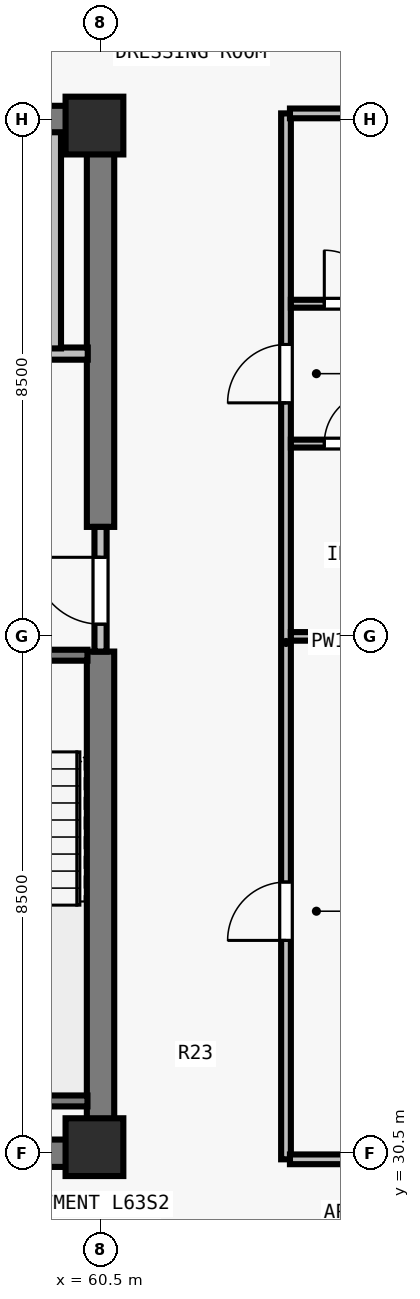
"""IFC4 building model, lengths in metres.
Left out: names, types, materials, properties, quantities, classifications, styles, units other than length and angle.
Written with IfcOpenShell. Run it as: python <this file> out.ifc"""

import sys

from ifc_helpers import new_model, si_unit, direction, frame, frame_2d, origin, origin_2d, place, context, subcontext, project, spatial, rectangle, extrude, element, fill, save


model = new_model("IFC4")
c1 = context("Model", 3, precision=1e-05, world=origin(), true_north=direction((0.0, 1.0)))
c2 = subcontext(c1, "Body", "Model", "MODEL_VIEW")
j1 = project(units=[si_unit("LENGTHUNIT", "METRE"), si_unit("PLANEANGLEUNIT", "RADIAN")], contexts=[c1])
p1 = place(None, origin())
s1 = spatial("IfcSite", under=j1, at=p1, CompositionType="ELEMENT")
p2 = place(p1, origin())
s2 = spatial("IfcBuilding", under=s1, at=p2, CompositionType="ELEMENT")
p3 = place(p2, frame((0.0, 0.0, 230.5)))
s3 = spatial("IfcBuildingStorey", under=s2, at=p3, CompositionType="ELEMENT", Elevation=230.5)
for number, where, z_axis, x_axis in (
    (1, (60.4, 30.6, 0.0), (0.0, 0.0, 1.0), (1.0, 0.0, 0.0)),
    (2, (60.4, 47.4, 0.0), (0.0, 0.0, 1.0), (1.0, 0.0, 0.0)),
):
    element("IfcColumn", number, at=place(p3, frame(where, z_axis=z_axis, x_axis=x_axis)), inside=s3, PredefinedType="COLUMN", context=c2, shape_type="SweptSolid", body=[
        extrude(rectangle(XDim=0.95, YDim=0.95, at=origin_2d()), origin(), (0.0, 0.0, 1.0), 3.5),
    ])
for number, where, z_axis, x_axis in (
    (3, (43.275, 30.5, 0.0), (0.0, 0.0, 1.0), (1.0, 0.0, 0.0)),
    (4, (43.275, 47.5, 0.0), (0.0, 0.0, 1.0), (1.0, 0.0, 0.0)),
):
    element("IfcWall", number, at=place(p3, frame(where, z_axis=z_axis, x_axis=x_axis)), inside=s3, PredefinedType="SHEAR", context=c2, shape_type="SweptSolid", body=[
        extrude(rectangle(XDim=17.45, YDim=0.45, at=frame_2d((8.725, 0.0))), origin(), (0.0, 0.0, 1.0), 3.29),
    ])
p4 = place(p3, frame((60.5, 30.715, 0.0), z_axis=(0.0, 0.0, 1.0), x_axis=(0.0, 1.0, 0.0)))
e5 = element("IfcWall", 5, at=p4, inside=s3, PredefinedType="SHEAR", context=c2, shape_type="SweptSolid", body=[
    extrude(rectangle(XDim=8.035, YDim=0.45, at=frame_2d((4.018, 0.0))), origin(), (0.0, 0.0, 1.0), 3.29),
])
p5 = place(p3, frame((60.5, 40.8, 0.0), z_axis=(0.0, 0.0, 1.0), x_axis=(0.0, 1.0, 0.0)))
e6 = element("IfcWall", 6, at=p5, inside=s3, PredefinedType="SHEAR", context=c2, shape_type="SweptSolid", body=[
    extrude(rectangle(XDim=6.485, YDim=0.45, at=frame_2d((3.242, 0.0))), origin(), (0.0, 0.0, 1.0), 3.29),
])
p6 = place(p3, frame((60.5, 38.75, 0.0), z_axis=(0.0, 0.0, 1.0), x_axis=(0.0, 1.0, 0.0)))
e7 = element("IfcWall", 7, at=p6, inside=s3, PredefinedType="SOLIDWALL", context=c2, shape_type="SweptSolid", body=[
    extrude(rectangle(XDim=2.05, YDim=0.2, at=frame_2d((1.025, 0.0))), origin(), (0.0, 0.0, 1.0), 3.29),
])
p7 = place(p6, frame((0.45, 0.0, 0.0)))
e8 = element("IfcOpeningElement", 8, at=p7, cuts=e7, PredefinedType="OPENING", context=c2, shape_type="SweptSolid", body=[
    extrude(rectangle(XDim=1.1, YDim=2.15, at=frame_2d((0.55, 1.075))), frame((0.0, 0.11, 0.0), z_axis=(0.0, -1.0, 0.0), x_axis=(1.0, 0.0, 0.0)), (0.0, 0.0, 1.0), 0.22),
])
p8 = place(p3, frame((56.735, 43.65, 0.0), z_axis=(0.0, 0.0, 1.0), x_axis=(1.0, 0.0, 0.0)))
e9 = element("IfcWall", 9, at=p8, inside=s3, PredefinedType="SOLIDWALL", context=c2, shape_type="SweptSolid", body=[
    extrude(rectangle(XDim=3.555, YDim=0.2, at=frame_2d((1.777, 0.0))), origin(), (0.0, 0.0, 1.0), 3.29),
])
p9 = place(p8, frame((1.295, 0.0, 0.0)))
e10 = element("IfcOpeningElement", 10, at=p9, cuts=e9, PredefinedType="OPENING", context=c2, shape_type="SweptSolid", body=[
    extrude(rectangle(XDim=1.1, YDim=2.2, at=frame_2d((0.55, 1.1))), frame((0.0, 0.11, 0.0), z_axis=(0.0, -1.0, 0.0), x_axis=(1.0, 0.0, 0.0)), (0.0, 0.0, 1.0), 0.22),
])
p10 = place(p3, frame((59.75, 43.735, 0.0), z_axis=(0.0, 0.0, 1.0), x_axis=(0.0, 1.0, 0.0)))
e11 = element("IfcWall", 11, at=p10, inside=s3, PredefinedType="SOLIDWALL", context=c2, shape_type="SweptSolid", body=[
    extrude(rectangle(XDim=3.555, YDim=0.2, at=frame_2d((1.777, 0.0))), origin(), (0.0, 0.0, 1.0), 3.29),
])
p11 = place(p3, frame((63.55, 30.4, 0.0), z_axis=(0.0, 0.0, 1.0), x_axis=(0.0, 1.0, 0.0)))
e12 = element("IfcWall", 12, at=p11, inside=s3, PredefinedType="PARTITIONING", context=c2, shape_type="SweptSolid", body=[
    extrude(rectangle(XDim=17.2, YDim=0.16, at=frame_2d((8.6, 0.0))), origin(), (0.0, 0.0, 1.0), 3.29),
])
p12 = place(p11, frame((3.6, 0.0, 0.0)))
e13 = element("IfcOpeningElement", 13, at=p12, cuts=e12, PredefinedType="OPENING", context=c2, shape_type="SweptSolid", body=[
    extrude(rectangle(XDim=0.96, YDim=2.12, at=frame_2d((0.48, 1.06))), frame((0.0, 0.09, 0.0), z_axis=(0.0, -1.0, 0.0), x_axis=(1.0, 0.0, 0.0)), (0.0, 0.0, 1.0), 0.18),
])
p13 = place(p11, frame((12.44, 0.0, 0.0)))
e14 = element("IfcOpeningElement", 14, at=p13, cuts=e12, PredefinedType="OPENING", context=c2, shape_type="SweptSolid", body=[
    extrude(rectangle(XDim=0.96, YDim=2.18, at=frame_2d((0.48, 1.09))), frame((0.0, 0.09, 0.0), z_axis=(0.0, -1.0, 0.0), x_axis=(1.0, 0.0, 0.0)), (0.0, 0.0, 1.0), 0.18),
])
for number, where, z_axis, x_axis in (
    (15, (63.615, 30.4, 0.0), (0.0, 0.0, 1.0), (1.0, 0.0, 0.0)),
    (16, (63.615, 47.6, 0.0), (0.0, 0.0, 1.0), (1.0, 0.0, 0.0)),
):
    element("IfcWall", number, at=place(p3, frame(where, z_axis=z_axis, x_axis=x_axis)), inside=s3, PredefinedType="PARTITIONING", context=c2, shape_type="SweptSolid", body=[
        extrude(rectangle(XDim=10.58, YDim=0.16, at=frame_2d((5.29, 0.0))), origin(), (0.0, 0.0, 1.0), 3.29),
    ])
p14 = place(p3, frame((63.63, 39.0, 0.0), z_axis=(0.0, 0.0, 1.0), x_axis=(1.0, 0.0, 0.0)))
e17 = element("IfcWall", 17, at=p14, inside=s3, PredefinedType="PARTITIONING", context=c2, shape_type="SweptSolid", body=[
    extrude(rectangle(XDim=10.565, YDim=0.14, at=frame_2d((5.283, 0.0))), origin(), (0.0, 0.0, 1.0), 3.29),
])
p15 = place(p3, frame((63.63, 42.17, 0.0), z_axis=(0.0, 0.0, 1.0), x_axis=(1.0, 0.0, 0.0)))
e18 = element("IfcWall", 18, at=p15, inside=s3, PredefinedType="PLUMBINGWALL", context=c2, shape_type="SweptSolid", body=[
    extrude(rectangle(XDim=2.75, YDim=0.13, at=frame_2d((1.375, 0.0))), origin(), (0.0, 0.0, 1.0), 3.29),
])
p16 = place(p15, frame((0.55, 0.0, 0.0)))
e19 = element("IfcOpeningElement", 19, at=p16, cuts=e18, PredefinedType="OPENING", context=c2, shape_type="SweptSolid", body=[
    extrude(rectangle(XDim=0.85, YDim=2.08, at=frame_2d((0.425, 1.04))), frame((0.0, 0.075, 0.0), z_axis=(0.0, -1.0, 0.0), x_axis=(1.0, 0.0, 0.0)), (0.0, 0.0, 1.0), 0.15),
])
p17 = place(p3, frame((63.63, 44.47, 0.0), z_axis=(0.0, 0.0, 1.0), x_axis=(1.0, 0.0, 0.0)))
e20 = element("IfcWall", 20, at=p17, inside=s3, PredefinedType="PLUMBINGWALL", context=c2, shape_type="SweptSolid", body=[
    extrude(rectangle(XDim=2.75, YDim=0.13, at=frame_2d((1.375, 0.0))), origin(), (0.0, 0.0, 1.0), 3.29),
])
p18 = place(p17, frame((0.55, 0.0, 0.0)))
e21 = element("IfcOpeningElement", 21, at=p18, cuts=e20, PredefinedType="OPENING", context=c2, shape_type="SweptSolid", body=[
    extrude(rectangle(XDim=0.88, YDim=2.1, at=frame_2d((0.44, 1.05))), frame((0.0, 0.075, 0.0), z_axis=(0.0, -1.0, 0.0), x_axis=(1.0, 0.0, 0.0)), (0.0, 0.0, 1.0), 0.15),
])
p19 = place(p3, frame((57.005, 38.69, 0.0), z_axis=(0.0, 0.0, 1.0), x_axis=(1.0, 0.0, 0.0)))
e22 = element("IfcWall", 22, at=p19, inside=s3, PredefinedType="SOLIDWALL", context=c2, shape_type="SweptSolid", body=[
    extrude(rectangle(XDim=3.28, YDim=0.18, at=frame_2d((1.64, 0.0))), origin(), (0.0, 0.0, 1.0), 3.29),
])
p20 = place(p19, frame((1.165, 0.0, 0.0)))
e23 = element("IfcOpeningElement", 23, at=p20, cuts=e22, PredefinedType="OPENING", context=c2, shape_type="SweptSolid", body=[
    extrude(rectangle(XDim=0.95, YDim=2.15, at=frame_2d((0.475, 1.075))), frame((0.0, 0.1, 0.0), z_axis=(0.0, -1.0, 0.0), x_axis=(1.0, 0.0, 0.0)), (0.0, 0.0, 1.0), 0.2),
])
p21 = place(p3, frame((57.005, 31.36, 0.0), z_axis=(0.0, 0.0, 1.0), x_axis=(1.0, 0.0, 0.0)))
e24 = element("IfcWall", 24, at=p21, inside=s3, PredefinedType="SOLIDWALL", context=c2, shape_type="SweptSolid", body=[
    extrude(rectangle(XDim=3.28, YDim=0.18, at=frame_2d((1.64, 0.0))), origin(), (0.0, 0.0, 1.0), 3.29),
])
p22 = place(p7, origin())
e25 = element("IfcDoor", 25, at=p22, inside=s3, OperationType="SINGLE_SWING_RIGHT", PredefinedType="DOOR", context=c2, shape_type="SweptSolid", body=[
    extrude(rectangle(XDim=1.1, YDim=2.15, at=frame_2d((0.55, 1.075))), frame((0.0, 0.025, 0.0), z_axis=(0.0, -1.0, 0.0), x_axis=(1.0, 0.0, 0.0)), (0.0, 0.0, 1.0), 0.05),
])
fill(e8, e25)
p23 = place(p12, origin())
e26 = element("IfcDoor", 26, at=p23, inside=s3, OperationType="SINGLE_SWING_LEFT", PredefinedType="DOOR", context=c2, shape_type="SweptSolid", body=[
    extrude(rectangle(XDim=0.96, YDim=2.12, at=frame_2d((0.48, 1.06))), frame((0.0, 0.025, 0.0), z_axis=(0.0, -1.0, 0.0), x_axis=(1.0, 0.0, 0.0)), (0.0, 0.0, 1.0), 0.05),
])
fill(e13, e26)
p24 = place(p16, origin())
e27 = element("IfcDoor", 27, at=p24, inside=s3, OperationType="SINGLE_SWING_RIGHT", PredefinedType="DOOR", context=c2, shape_type="SweptSolid", body=[
    extrude(rectangle(XDim=0.85, YDim=2.08, at=frame_2d((0.425, 1.04))), frame((0.0, 0.025, 0.0), z_axis=(0.0, -1.0, 0.0), x_axis=(1.0, 0.0, 0.0)), (0.0, 0.0, 1.0), 0.05),
])
fill(e19, e27)
p25 = place(p18, origin())
e28 = element("IfcDoor", 28, at=p25, inside=s3, OperationType="SINGLE_SWING_LEFT", PredefinedType="DOOR", context=c2, shape_type="SweptSolid", body=[
    extrude(rectangle(XDim=0.88, YDim=2.1, at=frame_2d((0.44, 1.05))), frame((0.0, 0.025, 0.0), z_axis=(0.0, -1.0, 0.0), x_axis=(1.0, 0.0, 0.0)), (0.0, 0.0, 1.0), 0.05),
])
fill(e21, e28)
p26 = place(p13, origin())
e29 = element("IfcDoor", 29, at=p26, inside=s3, OperationType="SINGLE_SWING_LEFT", PredefinedType="DOOR", context=c2, shape_type="SweptSolid", body=[
    extrude(rectangle(XDim=0.96, YDim=2.18, at=frame_2d((0.48, 1.09))), frame((0.0, 0.025, 0.0), z_axis=(0.0, -1.0, 0.0), x_axis=(1.0, 0.0, 0.0)), (0.0, 0.0, 1.0), 0.05),
])
fill(e14, e29)
save(model, sys.argv[1])
